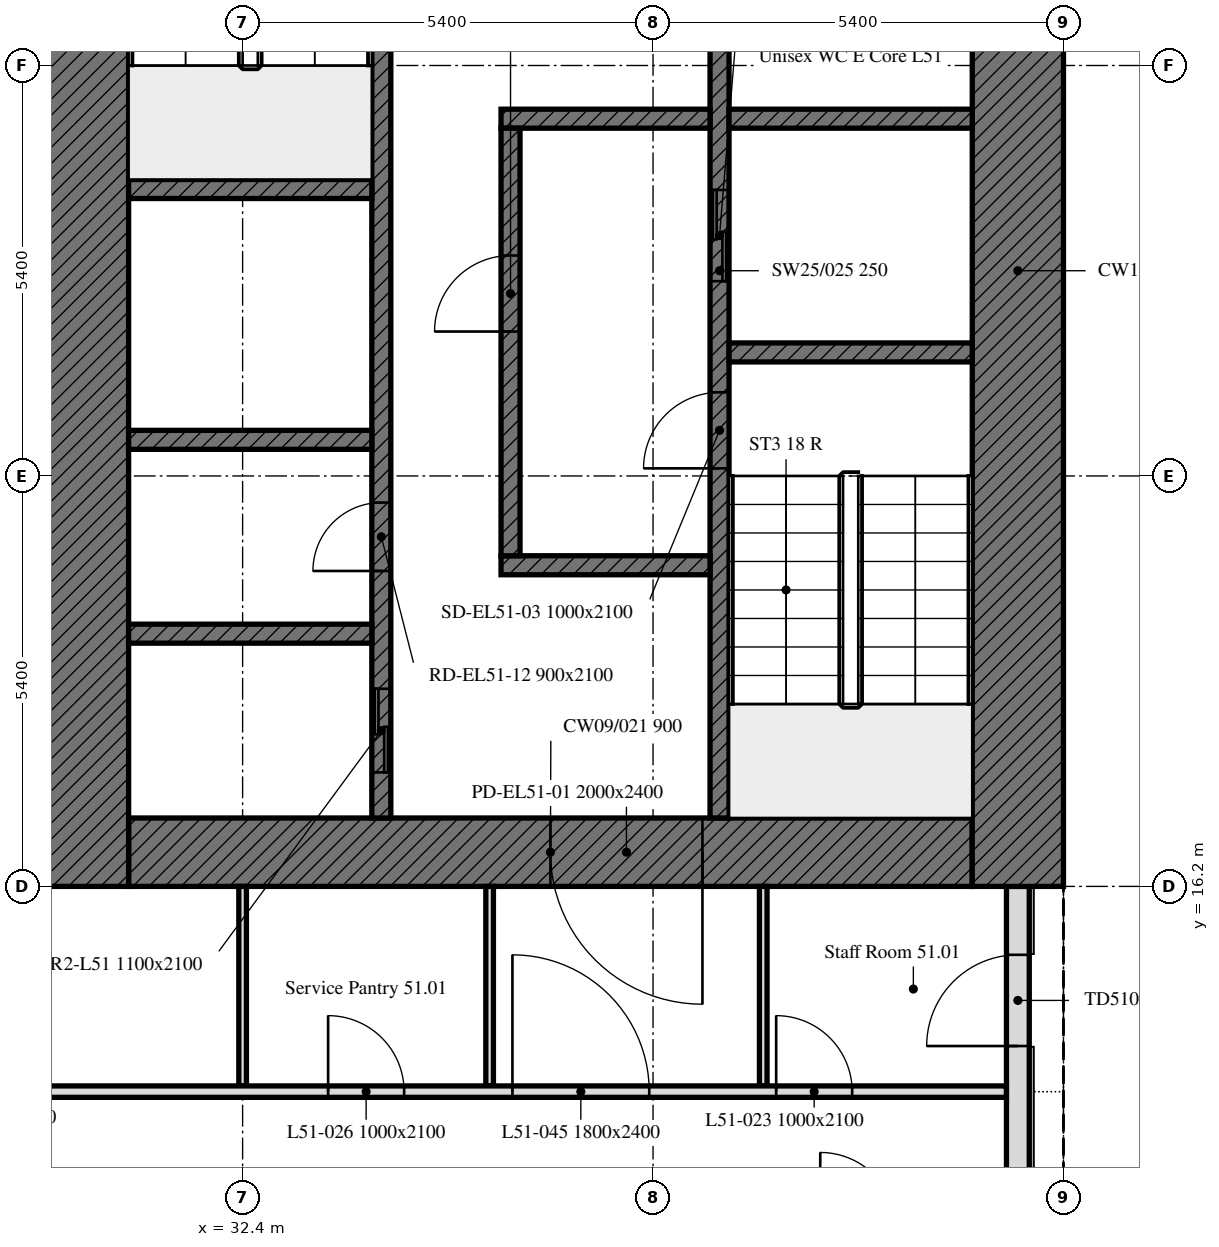
"""IFC4 building model, lengths in metres.
Left out: names, types, materials, properties, quantities, classifications, styles, units other than length and angle.
Written with IfcOpenShell. Run it as: python <this file> out.ifc"""

import sys

from ifc_helpers import new_model, si_unit, direction, frame, frame_2d, origin, place, context, subcontext, project, spatial, rectangle, extrude, element, fill, save


model = new_model("IFC4")
c1 = context("Model", 3, precision=1e-05, world=origin(), true_north=direction((0.0, 1.0)))
c2 = subcontext(c1, "Body", "Model", "MODEL_VIEW")
j1 = project(units=[si_unit("LENGTHUNIT", "METRE"), si_unit("PLANEANGLEUNIT", "RADIAN")], contexts=[c1])
p1 = place(None, origin())
s1 = spatial("IfcSite", under=j1, at=p1, CompositionType="ELEMENT")
p2 = place(p1, origin())
s2 = spatial("IfcBuilding", under=s1, at=p2, CompositionType="ELEMENT")
p3 = place(p2, frame((0.0, 0.0, 207.1)))
s3 = spatial("IfcBuildingStorey", under=s2, at=p3, CompositionType="ELEMENT", Elevation=207.1)
p4 = place(p3, frame((42.6, 10.986, 0.0), z_axis=(0.0, 0.0, 1.0), x_axis=(0.0, 1.0, 0.0)))
e1 = element("IfcWall", 1, at=p4, inside=s3, PredefinedType="SOLIDWALL", context=c2, shape_type="SweptSolid", body=[
    extrude(rectangle(XDim=5.214, YDim=0.3, at=frame_2d((2.607, 0.0))), origin(), (0.0, 0.0, 1.0), 3.0),
])
p5 = place(p4, frame((3.114, 0.0, 0.0)))
e2 = element("IfcOpeningElement", 2, at=p5, cuts=e1, PredefinedType="OPENING", context=c2, shape_type="SweptSolid", body=[
    extrude(rectangle(XDim=1.2, YDim=2.4, at=frame_2d((0.6, 1.2))), frame((0.0, 0.16, 0.0), z_axis=(0.0, -1.0, 0.0), x_axis=(1.0, 0.0, 0.0)), (0.0, 0.0, 1.0), 0.32),
])
p6 = place(p3, frame((42.0, 16.65, 0.0), z_axis=(0.0, 0.0, 1.0), x_axis=(-1.0, 0.0, 0.0)))
e3 = element("IfcWall", 3, at=p6, inside=s3, PredefinedType="SOLIDWALL", context=c2, shape_type="SweptSolid", body=[
    extrude(rectangle(XDim=11.1, YDim=0.9, at=frame_2d((5.55, 0.0))), origin(), (0.0, 0.0, 1.0), 3.0),
])
p7 = place(p6, frame((3.55, 0.0, 0.0)))
e4 = element("IfcOpeningElement", 4, at=p7, cuts=e3, PredefinedType="OPENING", context=c2, shape_type="SweptSolid", body=[
    extrude(rectangle(XDim=2.0, YDim=2.4, at=frame_2d((1.0, 1.2))), frame((0.0, 0.45, 0.0), z_axis=(0.0, -1.0, 0.0), x_axis=(1.0, 0.0, 0.0)), (0.0, 0.0, 1.0), 0.9),
])
for number, where, z_axis, x_axis in (
    (5, (42.6, 32.4, 0.0), (0.0, 0.0, 1.0), (0.0, -1.0, 0.0)),
    (6, (30.3, 16.2, 0.0), (0.0, 0.0, 1.0), (0.0, 1.0, 0.0)),
):
    element("IfcWall", number, at=place(p3, frame(where, z_axis=z_axis, x_axis=x_axis)), inside=s3, PredefinedType="SOLIDWALL", context=c2, shape_type="SweptSolid", body=[
        extrude(rectangle(XDim=16.2, YDim=1.2, at=frame_2d((8.1, 0.0))), origin(), (0.0, 0.0, 1.0), 3.0),
    ])
p8 = place(p3, frame((38.675, 17.1, 0.0), z_axis=(0.0, 0.0, 1.0), x_axis=(0.0, 1.0, 0.0)))
e7 = element("IfcWall", 7, at=p8, inside=s3, PredefinedType="SOLIDWALL", context=c2, shape_type="SweptSolid", body=[
    extrude(rectangle(XDim=14.4, YDim=0.25, at=frame_2d((7.2, 0.0))), origin(), (0.0, 0.0, 1.0), 3.0),
])
p9 = place(p8, frame((4.6, 0.0, 0.0)))
e8 = element("IfcOpeningElement", 8, at=p9, cuts=e7, PredefinedType="OPENING", context=c2, shape_type="SweptSolid", body=[
    extrude(rectangle(XDim=1.0, YDim=2.1, at=frame_2d((0.5, 1.05))), frame((0.0, 0.125, 0.0), z_axis=(0.0, -1.0, 0.0), x_axis=(1.0, 0.0, 0.0)), (0.0, 0.0, 1.0), 0.25),
])
p10 = place(p8, frame((7.062, 0.0, 0.0)))
e9 = element("IfcOpeningElement", 9, at=p10, cuts=e7, PredefinedType="OPENING", context=c2, shape_type="SweptSolid", body=[
    extrude(rectangle(XDim=1.2, YDim=2.1, at=frame_2d((0.6, 1.05))), frame((0.0, 0.125, 0.0), z_axis=(0.0, -1.0, 0.0), x_axis=(1.0, 0.0, 0.0)), (0.0, 0.0, 1.0), 0.25),
])
p11 = place(p8, frame((10.106, 0.0, 0.0)))
e10 = element("IfcOpeningElement", 10, at=p11, cuts=e7, PredefinedType="OPENING", context=c2, shape_type="SweptSolid", body=[
    extrude(rectangle(XDim=0.9, YDim=2.1, at=frame_2d((0.45, 1.05))), frame((0.0, 0.125, 0.0), z_axis=(0.0, -1.0, 0.0), x_axis=(1.0, 0.0, 0.0)), (0.0, 0.0, 1.0), 0.25),
])
p12 = place(p8, frame((12.048, 0.0, 0.0)))
e11 = element("IfcOpeningElement", 11, at=p12, cuts=e7, PredefinedType="OPENING", context=c2, shape_type="SweptSolid", body=[
    extrude(rectangle(XDim=0.9, YDim=2.1, at=frame_2d((0.45, 1.05))), frame((0.0, 0.125, 0.0), z_axis=(0.0, -1.0, 0.0), x_axis=(1.0, 0.0, 0.0)), (0.0, 0.0, 1.0), 0.25),
])
p13 = place(p8, frame((13.354, 0.0, 0.0)))
e12 = element("IfcOpeningElement", 12, at=p13, cuts=e7, PredefinedType="OPENING", context=c2, shape_type="SweptSolid", body=[
    extrude(rectangle(XDim=0.9, YDim=2.1, at=frame_2d((0.45, 1.05))), frame((0.0, 0.125, 0.0), z_axis=(0.0, -1.0, 0.0), x_axis=(1.0, 0.0, 0.0)), (0.0, 0.0, 1.0), 0.25),
])
p14 = place(p3, frame((34.225, 17.1, 0.0), z_axis=(0.0, 0.0, 1.0), x_axis=(0.0, 1.0, 0.0)))
e13 = element("IfcWall", 13, at=p14, inside=s3, PredefinedType="SOLIDWALL", context=c2, shape_type="SweptSolid", body=[
    extrude(rectangle(XDim=14.4, YDim=0.25, at=frame_2d((7.2, 0.0))), origin(), (0.0, 0.0, 1.0), 3.0),
])
p15 = place(p14, frame((13.15, 0.0, 0.0)))
e14 = element("IfcOpeningElement", 14, at=p15, cuts=e13, PredefinedType="OPENING", context=c2, shape_type="SweptSolid", body=[
    extrude(rectangle(XDim=1.0, YDim=2.1, at=frame_2d((0.5, 1.05))), frame((0.0, 0.125, 0.0), z_axis=(0.0, -1.0, 0.0), x_axis=(1.0, 0.0, 0.0)), (0.0, 0.0, 1.0), 0.25),
])
p16 = place(p14, frame((0.6, 0.0, 0.0)))
e15 = element("IfcOpeningElement", 15, at=p16, cuts=e13, PredefinedType="OPENING", context=c2, shape_type="SweptSolid", body=[
    extrude(rectangle(XDim=1.1, YDim=2.1, at=frame_2d((0.55, 1.05))), frame((0.0, 0.125, 0.0), z_axis=(0.0, -1.0, 0.0), x_axis=(1.0, 0.0, 0.0)), (0.0, 0.0, 1.0), 0.25),
])
p17 = place(p14, frame((3.25, 0.0, 0.0)))
e16 = element("IfcOpeningElement", 16, at=p17, cuts=e13, PredefinedType="OPENING", context=c2, shape_type="SweptSolid", body=[
    extrude(rectangle(XDim=0.9, YDim=2.1, at=frame_2d((0.45, 1.05))), frame((0.0, 0.125, 0.0), z_axis=(0.0, -1.0, 0.0), x_axis=(1.0, 0.0, 0.0)), (0.0, 0.0, 1.0), 0.25),
])
p18 = place(p3, frame((38.8, 23.225, 0.0), z_axis=(0.0, 0.0, 1.0), x_axis=(1.0, 0.0, 0.0)))
e17 = element("IfcWall", 17, at=p18, inside=s3, PredefinedType="SOLIDWALL", context=c2, shape_type="SweptSolid", body=[
    extrude(rectangle(XDim=3.2, YDim=0.25, at=frame_2d((1.6, 0.0))), origin(), (0.0, 0.0, 1.0), 3.0),
])
for number, where, z_axis, x_axis in (
    (18, (30.9, 25.375, 0.0), (0.0, 0.0, 1.0), (1.0, 0.0, 0.0)),
    (19, (30.9, 22.075, 0.0), (0.0, 0.0, 1.0), (1.0, 0.0, 0.0)),
):
    element("IfcWall", number, at=place(p3, frame(where, z_axis=z_axis, x_axis=x_axis)), inside=s3, PredefinedType="SOLIDWALL", context=c2, shape_type="SweptSolid", body=[
        extrude(rectangle(XDim=3.2, YDim=0.25, at=frame_2d((1.6, 0.0))), origin(), (0.0, 0.0, 1.0), 3.0),
    ])
p19 = place(p3, frame((38.8, 26.3, 0.0), z_axis=(0.0, 0.0, 1.0), x_axis=(1.0, 0.0, 0.0)))
e20 = element("IfcWall", 20, at=p19, inside=s3, PredefinedType="SOLIDWALL", context=c2, shape_type="SweptSolid", body=[
    extrude(rectangle(XDim=3.2, YDim=0.25, at=frame_2d((1.6, 0.0))), origin(), (0.0, 0.0, 1.0), 3.0),
])
for number, where, z_axis, x_axis in (
    (21, (35.8, 26.3, 0.0), (0.0, 0.0, 1.0), (1.0, 0.0, 0.0)),
    (22, (35.8, 20.425, 0.0), (0.0, 0.0, 1.0), (1.0, 0.0, 0.0)),
):
    element("IfcWall", number, at=place(p3, frame(where, z_axis=z_axis, x_axis=x_axis)), inside=s3, PredefinedType="SOLIDWALL", context=c2, shape_type="SweptSolid", body=[
        extrude(rectangle(XDim=2.75, YDim=0.25, at=frame_2d((1.375, 0.0))), origin(), (0.0, 0.0, 1.0), 3.0),
    ])
p20 = place(p3, frame((35.925, 20.55, 0.0), z_axis=(0.0, 0.0, 1.0), x_axis=(0.0, 1.0, 0.0)))
e23 = element("IfcWall", 23, at=p20, inside=s3, PredefinedType="SOLIDWALL", context=c2, shape_type="SweptSolid", body=[
    extrude(rectangle(XDim=5.625, YDim=0.25, at=frame_2d((2.812, 0.0))), origin(), (0.0, 0.0, 1.0), 3.0),
])
p21 = place(p20, frame((2.95, 0.0, 0.0)))
e24 = element("IfcOpeningElement", 24, at=p21, cuts=e23, PredefinedType="OPENING", context=c2, shape_type="SweptSolid", body=[
    extrude(rectangle(XDim=1.0, YDim=2.1, at=frame_2d((0.5, 1.05))), frame((0.0, 0.125, 0.0), z_axis=(0.0, -1.0, 0.0), x_axis=(1.0, 0.0, 0.0)), (0.0, 0.0, 1.0), 0.25),
])
p22 = place(p3, frame((30.9, 19.525, 0.0), z_axis=(0.0, 0.0, 1.0), x_axis=(1.0, 0.0, 0.0)))
e25 = element("IfcWall", 25, at=p22, inside=s3, PredefinedType="SOLIDWALL", context=c2, shape_type="SweptSolid", body=[
    extrude(rectangle(XDim=3.2, YDim=0.25, at=frame_2d((1.6, 0.0))), origin(), (0.0, 0.0, 1.0), 3.0),
])
for number, where, z_axis, x_axis in (
    (26, (32.4, 13.575, 0.0), (0.0, 0.0, 1.0), (0.0, 1.0, 0.0)),
    (27, (35.65, 16.2, 0.0), (0.0, 0.0, 1.0), (0.0, -1.0, 0.0)),
    (28, (39.25, 13.575, 0.0), (0.0, 0.0, 1.0), (0.0, 1.0, 0.0)),
):
    element("IfcWall", number, at=place(p3, frame(where, z_axis=z_axis, x_axis=x_axis)), inside=s3, PredefinedType="PARTITIONING", context=c2, shape_type="SweptSolid", body=[
        extrude(rectangle(XDim=2.625, YDim=0.1, at=frame_2d((1.312, 0.0))), origin(), (0.0, 0.0, 1.0), 3.0),
    ])
p23 = place(p3, frame((16.3, 13.5, 0.0), z_axis=(0.0, 0.0, 1.0), x_axis=(1.0, 0.0, 0.0)))
e29 = element("IfcWall", 29, at=p23, inside=s3, PredefinedType="PARTITIONING", context=c2, shape_type="SweptSolid", body=[
    extrude(rectangle(XDim=26.149, YDim=0.15, at=frame_2d((13.074, 0.0))), origin(), (0.0, 0.0, 1.0), 3.0),
])
p24 = place(p23, frame((7.5, 0.0, 0.0)))
e30 = element("IfcOpeningElement", 30, at=p24, cuts=e29, PredefinedType="OPENING", context=c2, shape_type="SweptSolid", body=[
    extrude(rectangle(XDim=1.0, YDim=2.1, at=frame_2d((0.5, 1.05))), frame((0.0, 0.075, 0.0), z_axis=(0.0, -1.0, 0.0), x_axis=(1.0, 0.0, 0.0)), (0.0, 0.0, 1.0), 0.15),
])
p25 = place(p23, frame((23.12, 0.0, 0.0)))
e31 = element("IfcOpeningElement", 31, at=p25, cuts=e29, PredefinedType="OPENING", context=c2, shape_type="SweptSolid", body=[
    extrude(rectangle(XDim=1.0, YDim=2.1, at=frame_2d((0.5, 1.05))), frame((0.0, 0.075, 0.0), z_axis=(0.0, -1.0, 0.0), x_axis=(1.0, 0.0, 0.0)), (0.0, 0.0, 1.0), 0.15),
])
p26 = place(p23, frame((17.225, 0.0, 0.0)))
e32 = element("IfcOpeningElement", 32, at=p26, cuts=e29, PredefinedType="OPENING", context=c2, shape_type="SweptSolid", body=[
    extrude(rectangle(XDim=1.0, YDim=2.1, at=frame_2d((0.5, 1.05))), frame((0.0, 0.075, 0.0), z_axis=(0.0, -1.0, 0.0), x_axis=(1.0, 0.0, 0.0)), (0.0, 0.0, 1.0), 0.15),
])
p27 = place(p23, frame((19.65, 0.0, 0.0)))
e33 = element("IfcOpeningElement", 33, at=p27, cuts=e29, PredefinedType="OPENING", context=c2, shape_type="SweptSolid", body=[
    extrude(rectangle(XDim=1.8, YDim=2.4, at=frame_2d((0.9, 1.2))), frame((0.0, 0.075, 0.0), z_axis=(0.0, -1.0, 0.0), x_axis=(1.0, 0.0, 0.0)), (0.0, 0.0, 1.0), 0.15),
])
p28 = place(p5, origin())
e34 = element("IfcDoor", 34, at=p28, inside=s3, OperationType="SINGLE_SWING_LEFT", PredefinedType="DOOR", context=c2, shape_type="SweptSolid", body=[
    extrude(rectangle(XDim=1.2, YDim=2.4, at=frame_2d((0.6, 1.2))), frame((0.0, 0.025, 0.0), z_axis=(0.0, -1.0, 0.0), x_axis=(1.0, 0.0, 0.0)), (0.0, 0.0, 1.0), 0.05),
])
fill(e2, e34)
p29 = place(p7, origin())
e35 = element("IfcDoor", 35, at=p29, inside=s3, OperationType="DOUBLE_DOOR_SINGLE_SWING", PredefinedType="DOOR", context=c2, shape_type="SweptSolid", body=[
    extrude(rectangle(XDim=2.0, YDim=2.4, at=frame_2d((1.0, 1.2))), frame((0.0, 0.025, 0.0), z_axis=(0.0, -1.0, 0.0), x_axis=(1.0, 0.0, 0.0)), (0.0, 0.0, 1.0), 0.05),
])
fill(e4, e35)
p30 = place(p9, origin())
e36 = element("IfcDoor", 36, at=p30, inside=s3, OperationType="SINGLE_SWING_LEFT", PredefinedType="DOOR", context=c2, shape_type="SweptSolid", body=[
    extrude(rectangle(XDim=1.0, YDim=2.1, at=frame_2d((0.5, 1.05))), frame((0.0, 0.025, 0.0), z_axis=(0.0, -1.0, 0.0), x_axis=(1.0, 0.0, 0.0)), (0.0, 0.0, 1.0), 0.05),
])
fill(e8, e36)
p31 = place(p21, origin())
e37 = element("IfcDoor", 37, at=p31, inside=s3, OperationType="SINGLE_SWING_LEFT", PredefinedType="DOOR", context=c2, shape_type="SweptSolid", body=[
    extrude(rectangle(XDim=1.0, YDim=2.1, at=frame_2d((0.5, 1.05))), frame((0.0, 0.025, 0.0), z_axis=(0.0, -1.0, 0.0), x_axis=(1.0, 0.0, 0.0)), (0.0, 0.0, 1.0), 0.05),
])
fill(e24, e37)
p32 = place(p10, origin())
e38 = element("IfcDoor", 38, at=p32, inside=s3, OperationType="DOUBLE_DOOR_SLIDING", PredefinedType="DOOR", context=c2, shape_type="SweptSolid", body=[
    extrude(rectangle(XDim=1.2, YDim=2.1, at=frame_2d((0.6, 1.05))), frame((0.0, 0.025, 0.0), z_axis=(0.0, -1.0, 0.0), x_axis=(1.0, 0.0, 0.0)), (0.0, 0.0, 1.0), 0.05),
])
fill(e9, e38)
p33 = place(p16, origin())
e39 = element("IfcDoor", 39, at=p33, inside=s3, OperationType="DOUBLE_DOOR_SLIDING", PredefinedType="DOOR", context=c2, shape_type="SweptSolid", body=[
    extrude(rectangle(XDim=1.1, YDim=2.1, at=frame_2d((0.55, 1.05))), frame((0.0, 0.025, 0.0), z_axis=(0.0, -1.0, 0.0), x_axis=(1.0, 0.0, 0.0)), (0.0, 0.0, 1.0), 0.05),
])
fill(e15, e39)
p34 = place(p17, origin())
e40 = element("IfcDoor", 40, at=p34, inside=s3, OperationType="SINGLE_SWING_LEFT", PredefinedType="DOOR", context=c2, shape_type="SweptSolid", body=[
    extrude(rectangle(XDim=0.9, YDim=2.1, at=frame_2d((0.45, 1.05))), frame((0.0, 0.025, 0.0), z_axis=(0.0, -1.0, 0.0), x_axis=(1.0, 0.0, 0.0)), (0.0, 0.0, 1.0), 0.05),
])
fill(e16, e40)
p35 = place(p25, origin())
e41 = element("IfcDoor", 41, at=p35, inside=s3, OperationType="SINGLE_SWING_RIGHT", PredefinedType="DOOR", context=c2, shape_type="SweptSolid", body=[
    extrude(rectangle(XDim=1.0, YDim=2.1, at=frame_2d((0.5, 1.05))), frame((0.0, 0.025, 0.0), z_axis=(0.0, -1.0, 0.0), x_axis=(1.0, 0.0, 0.0)), (0.0, 0.0, 1.0), 0.05),
])
fill(e31, e41)
p36 = place(p26, origin())
e42 = element("IfcDoor", 42, at=p36, inside=s3, OperationType="SINGLE_SWING_LEFT", PredefinedType="DOOR", context=c2, shape_type="SweptSolid", body=[
    extrude(rectangle(XDim=1.0, YDim=2.1, at=frame_2d((0.5, 1.05))), frame((0.0, 0.025, 0.0), z_axis=(0.0, -1.0, 0.0), x_axis=(1.0, 0.0, 0.0)), (0.0, 0.0, 1.0), 0.05),
])
fill(e32, e42)
p37 = place(p27, origin())
e43 = element("IfcDoor", 43, at=p37, inside=s3, OperationType="DOUBLE_DOOR_SINGLE_SWING", PredefinedType="DOOR", context=c2, shape_type="SweptSolid", body=[
    extrude(rectangle(XDim=1.8, YDim=2.4, at=frame_2d((0.9, 1.2))), frame((0.0, 0.025, 0.0), z_axis=(0.0, -1.0, 0.0), x_axis=(1.0, 0.0, 0.0)), (0.0, 0.0, 1.0), 0.05),
])
fill(e33, e43)
save(model, sys.argv[1])
